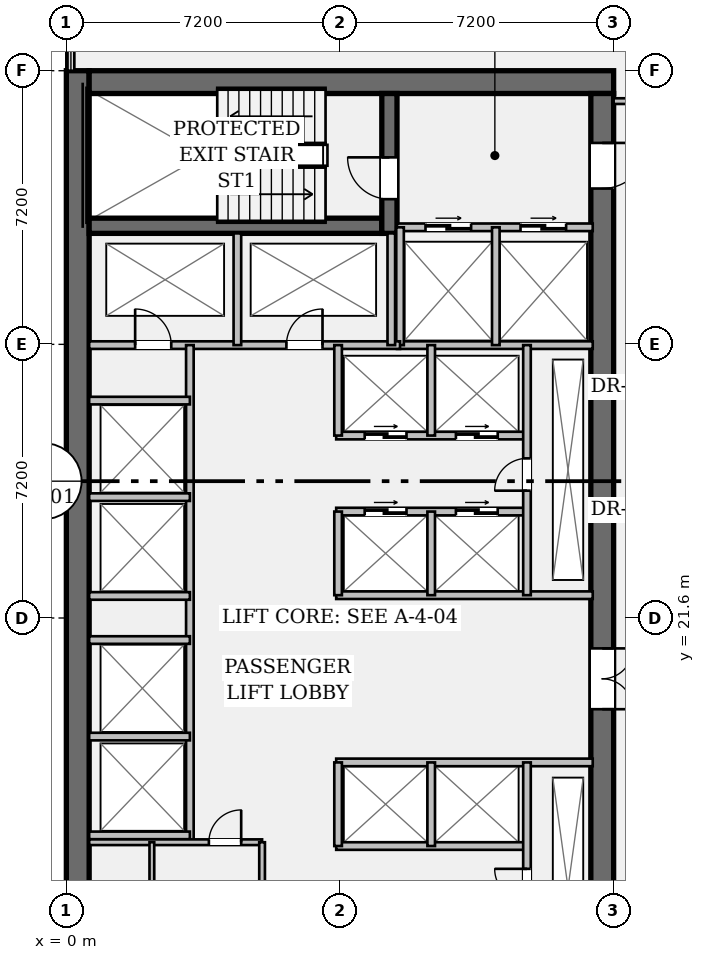
"""IFC4 building model, lengths in metres.
Left out: names, types, materials, properties, quantities, classifications, styles, units other than length and angle.
Written with IfcOpenShell. Run it as: python <this file> out.ifc"""

import sys

from ifc_helpers import new_model, si_unit, direction, frame, frame_2d, origin, place, context, subcontext, project, spatial, rectangle, extrude, element, fill, save


model = new_model("IFC4")
c1 = context("Model", 3, precision=1e-05, world=origin(), true_north=direction((0.0, 1.0)))
c2 = subcontext(c1, "Body", "Model", "MODEL_VIEW")
j1 = project(units=[si_unit("LENGTHUNIT", "METRE"), si_unit("PLANEANGLEUNIT", "RADIAN")], contexts=[c1])
p1 = place(None, origin())
s1 = spatial("IfcSite", under=j1, at=p1, CompositionType="ELEMENT")
p2 = place(p1, origin())
s2 = spatial("IfcBuilding", under=s1, at=p2, CompositionType="ELEMENT")
p3 = place(p2, frame((0.0, 0.0, 38.85)))
s3 = spatial("IfcBuildingStorey", under=s2, at=p3, CompositionType="ELEMENT", Elevation=38.85)
p4 = place(p3, frame((0.3, 7.2, 0.0), z_axis=(0.0, 0.0, 1.0), x_axis=(0.0, 1.0, 0.0)))
e1 = element("IfcWall", 1, at=p4, inside=s3, PredefinedType="SHEAR", context=c2, shape_type="SweptSolid", body=[
    extrude(rectangle(XDim=28.8, YDim=0.6, at=frame_2d((14.4, 0.0))), origin(), (0.0, 0.0, 1.0), 3.57),
])
p5 = place(p3, frame((0.6, 35.7, 0.0), z_axis=(0.0, 0.0, 1.0), x_axis=(1.0, 0.0, 0.0)))
e2 = element("IfcWall", 2, at=p5, inside=s3, PredefinedType="SHEAR", context=c2, shape_type="SweptSolid", body=[
    extrude(rectangle(XDim=13.8, YDim=0.6, at=frame_2d((6.9, 0.0))), origin(), (0.0, 0.0, 1.0), 3.57),
])
p6 = place(p3, frame((14.1, 35.4, 0.0), z_axis=(0.0, 0.0, 1.0), x_axis=(0.0, -1.0, 0.0)))
e3 = element("IfcWall", 3, at=p6, inside=s3, PredefinedType="SHEAR", context=c2, shape_type="SweptSolid", body=[
    extrude(rectangle(XDim=27.6, YDim=0.6, at=frame_2d((13.8, 0.0))), origin(), (0.0, 0.0, 1.0), 3.57),
])
p7 = place(p6, frame((1.3, 0.0, 0.0)))
e4 = element("IfcOpeningElement", 4, at=p7, cuts=e3, PredefinedType="OPENING", context=c2, shape_type="SweptSolid", body=[
    extrude(rectangle(XDim=1.2, YDim=2.15, at=frame_2d((0.6, 1.075))), frame((0.0, 0.312, 0.0), z_axis=(0.0, -1.0, 0.0), x_axis=(1.0, 0.0, 0.0)), (0.0, 0.0, 1.0), 0.624),
])
p8 = place(p6, frame((25.25, 0.0, 0.0)))
e5 = element("IfcOpeningElement", 5, at=p8, cuts=e3, PredefinedType="OPENING", context=c2, shape_type="SweptSolid", body=[
    extrude(rectangle(XDim=1.2, YDim=2.15, at=frame_2d((0.6, 1.075))), frame((0.0, 0.312, 0.0), z_axis=(0.0, -1.0, 0.0), x_axis=(1.0, 0.0, 0.0)), (0.0, 0.0, 1.0), 0.624),
])
p9 = place(p6, frame((14.6, 0.0, 0.0)))
e6 = element("IfcOpeningElement", 6, at=p9, cuts=e3, PredefinedType="OPENING", context=c2, shape_type="SweptSolid", body=[
    extrude(rectangle(XDim=1.6, YDim=2.2, at=frame_2d((0.8, 1.1))), frame((0.0, 0.312, 0.0), z_axis=(0.0, -1.0, 0.0), x_axis=(1.0, 0.0, 0.0)), (0.0, 0.0, 1.0), 0.624),
])
p10 = place(p3, frame((0.6, 31.92, 0.0), z_axis=(0.0, 0.0, 1.0), x_axis=(1.0, 0.0, 0.0)))
e7 = element("IfcWall", 7, at=p10, inside=s3, PredefinedType="SHEAR", context=c2, shape_type="SweptSolid", body=[
    extrude(rectangle(XDim=7.7, YDim=0.4, at=frame_2d((3.85, 0.0))), origin(), (0.0, 0.0, 1.0), 3.57),
])
p11 = place(p3, frame((8.5, 31.72, 0.0), z_axis=(0.0, 0.0, 1.0), x_axis=(0.0, 1.0, 0.0)))
e8 = element("IfcWall", 8, at=p11, inside=s3, PredefinedType="SHEAR", context=c2, shape_type="SweptSolid", body=[
    extrude(rectangle(XDim=3.68, YDim=0.4, at=frame_2d((1.84, 0.0))), origin(), (0.0, 0.0, 1.0), 3.57),
])
p12 = place(p11, frame((0.9, 0.0, 0.0)))
e9 = element("IfcOpeningElement", 9, at=p12, cuts=e8, PredefinedType="OPENING", context=c2, shape_type="SweptSolid", body=[
    extrude(rectangle(XDim=1.1, YDim=2.15, at=frame_2d((0.55, 1.075))), frame((0.0, 0.212, 0.0), z_axis=(0.0, -1.0, 0.0), x_axis=(1.0, 0.0, 0.0)), (0.0, 0.0, 1.0), 0.424),
])
p13 = place(p3, frame((8.7, 31.88, 0.0), z_axis=(0.0, 0.0, 1.0), x_axis=(1.0, 0.0, 0.0)))
e10 = element("IfcWall", 10, at=p13, inside=s3, PredefinedType="PARTITIONING", context=c2, shape_type="SweptSolid", body=[
    extrude(rectangle(XDim=5.15, YDim=0.2, at=frame_2d((2.575, 0.0))), origin(), (0.0, 0.0, 1.0), 3.57),
])
p14 = place(p13, frame((0.75, 0.0, 0.0)))
e11 = element("IfcOpeningElement", 11, at=p14, cuts=e10, PredefinedType="OPENING", context=c2, shape_type="SweptSolid", body=[
    extrude(rectangle(XDim=1.2, YDim=2.2, at=frame_2d((0.6, 1.1))), frame((0.0, 0.112, 0.0), z_axis=(0.0, -1.0, 0.0), x_axis=(1.0, 0.0, 0.0)), (0.0, 0.0, 1.0), 0.224),
])
p15 = place(p13, frame((3.25, 0.0, 0.0)))
e12 = element("IfcOpeningElement", 12, at=p15, cuts=e10, PredefinedType="OPENING", context=c2, shape_type="SweptSolid", body=[
    extrude(rectangle(XDim=1.2, YDim=2.2, at=frame_2d((0.6, 1.1))), frame((0.0, 0.112, 0.0), z_axis=(0.0, -1.0, 0.0), x_axis=(1.0, 0.0, 0.0)), (0.0, 0.0, 1.0), 0.224),
])
p16 = place(p3, frame((8.7, 28.78, 0.0), z_axis=(0.0, 0.0, 1.0), x_axis=(1.0, 0.0, 0.0)))
e13 = element("IfcWall", 13, at=p16, inside=s3, PredefinedType="PARTITIONING", context=c2, shape_type="SweptSolid", body=[
    extrude(rectangle(XDim=5.15, YDim=0.2, at=frame_2d((2.575, 0.0))), origin(), (0.0, 0.0, 1.0), 3.57),
])
for number, where, z_axis, x_axis in (
    (14, (8.78, 28.78, 0.0), (0.0, 0.0, 1.0), (0.0, 1.0, 0.0)),
    (15, (11.3, 28.78, 0.0), (0.0, 0.0, 1.0), (0.0, 1.0, 0.0)),
):
    element("IfcWall", number, at=place(p3, frame(where, z_axis=z_axis, x_axis=x_axis)), inside=s3, PredefinedType="PARTITIONING", context=c2, shape_type="SweptSolid", body=[
        extrude(rectangle(XDim=3.1, YDim=0.2, at=frame_2d((1.55, 0.0))), origin(), (0.0, 0.0, 1.0), 3.57),
    ])
p17 = place(p3, frame((0.6, 28.78, 0.0), z_axis=(0.0, 0.0, 1.0), x_axis=(1.0, 0.0, 0.0)))
e16 = element("IfcWall", 16, at=p17, inside=s3, PredefinedType="PARTITIONING", context=c2, shape_type="SweptSolid", body=[
    extrude(rectangle(XDim=8.18, YDim=0.2, at=frame_2d((4.09, 0.0))), origin(), (0.0, 0.0, 1.0), 3.57),
])
p18 = place(p17, frame((1.21, 0.0, 0.0)))
e17 = element("IfcOpeningElement", 17, at=p18, cuts=e16, PredefinedType="OPENING", context=c2, shape_type="SweptSolid", body=[
    extrude(rectangle(XDim=0.95, YDim=2.15, at=frame_2d((0.475, 1.075))), frame((0.0, 0.112, 0.0), z_axis=(0.0, -1.0, 0.0), x_axis=(1.0, 0.0, 0.0)), (0.0, 0.0, 1.0), 0.224),
])
p19 = place(p17, frame((5.19, 0.0, 0.0)))
e18 = element("IfcOpeningElement", 18, at=p19, cuts=e16, PredefinedType="OPENING", context=c2, shape_type="SweptSolid", body=[
    extrude(rectangle(XDim=0.95, YDim=2.15, at=frame_2d((0.475, 1.075))), frame((0.0, 0.112, 0.0), z_axis=(0.0, -1.0, 0.0), x_axis=(1.0, 0.0, 0.0)), (0.0, 0.0, 1.0), 0.224),
])
for number, where, z_axis, x_axis in (
    (19, (4.5, 28.78, 0.0), (0.0, 0.0, 1.0), (0.0, 1.0, 0.0)),
    (20, (8.55, 28.78, 0.0), (0.0, 0.0, 1.0), (0.0, 1.0, 0.0)),
):
    element("IfcWall", number, at=place(p3, frame(where, z_axis=z_axis, x_axis=x_axis)), inside=s3, PredefinedType="PARTITIONING", context=c2, shape_type="SweptSolid", body=[
        extrude(rectangle(XDim=2.94, YDim=0.2, at=frame_2d((1.47, 0.0))), origin(), (0.0, 0.0, 1.0), 3.57),
    ])
p20 = place(p3, frame((3.25, 15.7, 0.0), z_axis=(0.0, 0.0, 1.0), x_axis=(0.0, 1.0, 0.0)))
e21 = element("IfcWall", 21, at=p20, inside=s3, PredefinedType="PARTITIONING", context=c2, shape_type="SweptSolid", body=[
    extrude(rectangle(XDim=13.08, YDim=0.2, at=frame_2d((6.54, 0.0))), origin(), (0.0, 0.0, 1.0), 3.57),
])
for number, where, z_axis, x_axis in (
    (22, (0.6, 15.88, 0.0), (0.0, 0.0, 1.0), (1.0, 0.0, 0.0)),
    (23, (0.6, 18.48, 0.0), (0.0, 0.0, 1.0), (1.0, 0.0, 0.0)),
    (24, (0.6, 22.18, 0.0), (0.0, 0.0, 1.0), (1.0, 0.0, 0.0)),
    (25, (0.6, 24.78, 0.0), (0.0, 0.0, 1.0), (1.0, 0.0, 0.0)),
    (26, (0.6, 21.02, 0.0), (0.0, 0.0, 1.0), (1.0, 0.0, 0.0)),
    (27, (0.6, 27.32, 0.0), (0.0, 0.0, 1.0), (1.0, 0.0, 0.0)),
):
    element("IfcWall", number, at=place(p3, frame(where, z_axis=z_axis, x_axis=x_axis)), inside=s3, PredefinedType="PARTITIONING", context=c2, shape_type="SweptSolid", body=[
        extrude(rectangle(XDim=2.65, YDim=0.2, at=frame_2d((1.325, 0.0))), origin(), (0.0, 0.0, 1.0), 3.57),
    ])
p21 = place(p3, frame((7.1, 22.2, 0.0), z_axis=(0.0, 0.0, 1.0), x_axis=(1.0, 0.0, 0.0)))
e28 = element("IfcWall", 28, at=p21, inside=s3, PredefinedType="PARTITIONING", context=c2, shape_type="SweptSolid", body=[
    extrude(rectangle(XDim=6.75, YDim=0.2, at=frame_2d((3.375, 0.0))), origin(), (0.0, 0.0, 1.0), 3.57),
])
p22 = place(p3, frame((7.1, 24.4, 0.0), z_axis=(0.0, 0.0, 1.0), x_axis=(1.0, 0.0, 0.0)))
e29 = element("IfcWall", 29, at=p22, inside=s3, PredefinedType="PARTITIONING", context=c2, shape_type="SweptSolid", body=[
    extrude(rectangle(XDim=5.02, YDim=0.2, at=frame_2d((2.51, 0.0))), origin(), (0.0, 0.0, 1.0), 3.57),
])
p23 = place(p22, frame((0.75, 0.0, 0.0)))
e30 = element("IfcOpeningElement", 30, at=p23, cuts=e29, PredefinedType="OPENING", context=c2, shape_type="SweptSolid", body=[
    extrude(rectangle(XDim=1.1, YDim=2.2, at=frame_2d((0.55, 1.1))), frame((0.0, 0.112, 0.0), z_axis=(0.0, -1.0, 0.0), x_axis=(1.0, 0.0, 0.0)), (0.0, 0.0, 1.0), 0.224),
])
p24 = place(p22, frame((3.15, 0.0, 0.0)))
e31 = element("IfcOpeningElement", 31, at=p24, cuts=e29, PredefinedType="OPENING", context=c2, shape_type="SweptSolid", body=[
    extrude(rectangle(XDim=1.1, YDim=2.2, at=frame_2d((0.55, 1.1))), frame((0.0, 0.112, 0.0), z_axis=(0.0, -1.0, 0.0), x_axis=(1.0, 0.0, 0.0)), (0.0, 0.0, 1.0), 0.224),
])
p25 = place(p3, frame((7.1, 26.4, 0.0), z_axis=(0.0, 0.0, 1.0), x_axis=(1.0, 0.0, 0.0)))
e32 = element("IfcWall", 32, at=p25, inside=s3, PredefinedType="PARTITIONING", context=c2, shape_type="SweptSolid", body=[
    extrude(rectangle(XDim=5.02, YDim=0.2, at=frame_2d((2.51, 0.0))), origin(), (0.0, 0.0, 1.0), 3.57),
])
p26 = place(p25, frame((0.75, 0.0, 0.0)))
e33 = element("IfcOpeningElement", 33, at=p26, cuts=e32, PredefinedType="OPENING", context=c2, shape_type="SweptSolid", body=[
    extrude(rectangle(XDim=1.1, YDim=2.2, at=frame_2d((0.55, 1.1))), frame((0.0, 0.112, 0.0), z_axis=(0.0, -1.0, 0.0), x_axis=(1.0, 0.0, 0.0)), (0.0, 0.0, 1.0), 0.224),
])
p27 = place(p25, frame((3.15, 0.0, 0.0)))
e34 = element("IfcOpeningElement", 34, at=p27, cuts=e32, PredefinedType="OPENING", context=c2, shape_type="SweptSolid", body=[
    extrude(rectangle(XDim=1.1, YDim=2.2, at=frame_2d((0.55, 1.1))), frame((0.0, 0.112, 0.0), z_axis=(0.0, -1.0, 0.0), x_axis=(1.0, 0.0, 0.0)), (0.0, 0.0, 1.0), 0.224),
])
p28 = place(p3, frame((7.15, 22.2, 0.0), z_axis=(0.0, 0.0, 1.0), x_axis=(0.0, 1.0, 0.0)))
e35 = element("IfcWall", 35, at=p28, inside=s3, PredefinedType="PARTITIONING", context=c2, shape_type="SweptSolid", body=[
    extrude(rectangle(XDim=2.2, YDim=0.2, at=frame_2d((1.1, 0.0))), origin(), (0.0, 0.0, 1.0), 3.57),
])
p29 = place(p3, frame((7.15, 26.4, 0.0), z_axis=(0.0, 0.0, 1.0), x_axis=(0.0, 1.0, 0.0)))
e36 = element("IfcWall", 36, at=p29, inside=s3, PredefinedType="PARTITIONING", context=c2, shape_type="SweptSolid", body=[
    extrude(rectangle(XDim=2.38, YDim=0.2, at=frame_2d((1.19, 0.0))), origin(), (0.0, 0.0, 1.0), 3.57),
])
p30 = place(p3, frame((9.6, 22.2, 0.0), z_axis=(0.0, 0.0, 1.0), x_axis=(0.0, 1.0, 0.0)))
e37 = element("IfcWall", 37, at=p30, inside=s3, PredefinedType="PARTITIONING", context=c2, shape_type="SweptSolid", body=[
    extrude(rectangle(XDim=2.2, YDim=0.2, at=frame_2d((1.1, 0.0))), origin(), (0.0, 0.0, 1.0), 3.57),
])
p31 = place(p3, frame((9.6, 26.4, 0.0), z_axis=(0.0, 0.0, 1.0), x_axis=(0.0, 1.0, 0.0)))
e38 = element("IfcWall", 38, at=p31, inside=s3, PredefinedType="PARTITIONING", context=c2, shape_type="SweptSolid", body=[
    extrude(rectangle(XDim=2.38, YDim=0.2, at=frame_2d((1.19, 0.0))), origin(), (0.0, 0.0, 1.0), 3.57),
])
p32 = place(p3, frame((12.12, 22.2, 0.0), z_axis=(0.0, 0.0, 1.0), x_axis=(0.0, 1.0, 0.0)))
e39 = element("IfcWall", 39, at=p32, inside=s3, PredefinedType="PARTITIONING", context=c2, shape_type="SweptSolid", body=[
    extrude(rectangle(XDim=6.58, YDim=0.2, at=frame_2d((3.29, 0.0))), origin(), (0.0, 0.0, 1.0), 3.57),
])
p33 = place(p32, frame((2.75, 0.0, 0.0)))
e40 = element("IfcOpeningElement", 40, at=p33, cuts=e39, PredefinedType="OPENING", context=c2, shape_type="SweptSolid", body=[
    extrude(rectangle(XDim=0.85, YDim=2.15, at=frame_2d((0.425, 1.075))), frame((0.0, 0.112, 0.0), z_axis=(0.0, -1.0, 0.0), x_axis=(1.0, 0.0, 0.0)), (0.0, 0.0, 1.0), 0.224),
])
p34 = place(p3, frame((7.1, 17.8, 0.0), z_axis=(0.0, 0.0, 1.0), x_axis=(1.0, 0.0, 0.0)))
e41 = element("IfcWall", 41, at=p34, inside=s3, PredefinedType="PARTITIONING", context=c2, shape_type="SweptSolid", body=[
    extrude(rectangle(XDim=6.75, YDim=0.2, at=frame_2d((3.375, 0.0))), origin(), (0.0, 0.0, 1.0), 3.57),
])
p35 = place(p3, frame((7.1, 15.6, 0.0), z_axis=(0.0, 0.0, 1.0), x_axis=(1.0, 0.0, 0.0)))
e42 = element("IfcWall", 42, at=p35, inside=s3, PredefinedType="PARTITIONING", context=c2, shape_type="SweptSolid", body=[
    extrude(rectangle(XDim=5.02, YDim=0.2, at=frame_2d((2.51, 0.0))), origin(), (0.0, 0.0, 1.0), 3.57),
])
for number, where, z_axis, x_axis in (
    (43, (7.15, 15.6, 0.0), (0.0, 0.0, 1.0), (0.0, 1.0, 0.0)),
    (44, (9.6, 15.6, 0.0), (0.0, 0.0, 1.0), (0.0, 1.0, 0.0)),
):
    element("IfcWall", number, at=place(p3, frame(where, z_axis=z_axis, x_axis=x_axis)), inside=s3, PredefinedType="PARTITIONING", context=c2, shape_type="SweptSolid", body=[
        extrude(rectangle(XDim=2.2, YDim=0.2, at=frame_2d((1.1, 0.0))), origin(), (0.0, 0.0, 1.0), 3.57),
    ])
p36 = place(p3, frame((12.12, 11.2, 0.0), z_axis=(0.0, 0.0, 1.0), x_axis=(0.0, 1.0, 0.0)))
e45 = element("IfcWall", 45, at=p36, inside=s3, PredefinedType="PARTITIONING", context=c2, shape_type="SweptSolid", body=[
    extrude(rectangle(XDim=6.6, YDim=0.2, at=frame_2d((3.3, 0.0))), origin(), (0.0, 0.0, 1.0), 3.57),
])
p37 = place(p36, frame((2.95, 0.0, 0.0)))
e46 = element("IfcOpeningElement", 46, at=p37, cuts=e45, PredefinedType="OPENING", context=c2, shape_type="SweptSolid", body=[
    extrude(rectangle(XDim=0.85, YDim=2.15, at=frame_2d((0.425, 1.075))), frame((0.0, 0.112, 0.0), z_axis=(0.0, -1.0, 0.0), x_axis=(1.0, 0.0, 0.0)), (0.0, 0.0, 1.0), 0.224),
])
p38 = place(p3, frame((0.6, 15.7, 0.0), z_axis=(0.0, 0.0, 1.0), x_axis=(1.0, 0.0, 0.0)))
e47 = element("IfcWall", 47, at=p38, inside=s3, PredefinedType="PARTITIONING", context=c2, shape_type="SweptSolid", body=[
    extrude(rectangle(XDim=4.55, YDim=0.15, at=frame_2d((2.275, 0.0))), origin(), (0.0, 0.0, 1.0), 3.57),
])
p39 = place(p38, frame((3.15, 0.0, 0.0)))
e48 = element("IfcOpeningElement", 48, at=p39, cuts=e47, PredefinedType="OPENING", context=c2, shape_type="SweptSolid", body=[
    extrude(rectangle(XDim=0.85, YDim=2.15, at=frame_2d((0.425, 1.075))), frame((0.0, 0.087, 0.0), z_axis=(0.0, -1.0, 0.0), x_axis=(1.0, 0.0, 0.0)), (0.0, 0.0, 1.0), 0.174),
])
p40 = place(p3, frame((5.15, 11.28, 0.0), z_axis=(0.0, 0.0, 1.0), x_axis=(0.0, 1.0, 0.0)))
e49 = element("IfcWall", 49, at=p40, inside=s3, PredefinedType="PARTITIONING", context=c2, shape_type="SweptSolid", body=[
    extrude(rectangle(XDim=4.42, YDim=0.15, at=frame_2d((2.21, 0.0))), origin(), (0.0, 0.0, 1.0), 3.57),
])
p41 = place(p3, frame((2.25, 11.28, 0.0), z_axis=(0.0, 0.0, 1.0), x_axis=(0.0, 1.0, 0.0)))
e50 = element("IfcWall", 50, at=p41, inside=s3, PredefinedType="PARTITIONING", context=c2, shape_type="SweptSolid", body=[
    extrude(rectangle(XDim=4.42, YDim=0.125, at=frame_2d((2.21, 0.0))), origin(), (0.0, 0.0, 1.0), 3.57),
])
p42 = place(p41, frame((1.65, 0.0, 0.0)))
e51 = element("IfcOpeningElement", 51, at=p42, cuts=e50, PredefinedType="OPENING", context=c2, shape_type="SweptSolid", body=[
    extrude(rectangle(XDim=0.85, YDim=2.15, at=frame_2d((0.425, 1.075))), frame((0.0, 0.074, 0.0), z_axis=(0.0, -1.0, 0.0), x_axis=(1.0, 0.0, 0.0)), (0.0, 0.0, 1.0), 0.149),
])
p43 = place(p3, frame((14.4, 35.2, 0.0), z_axis=(0.0, 0.0, 1.0), x_axis=(1.0, 0.0, 0.0)))
e52 = element("IfcWall", 52, at=p43, inside=s3, PredefinedType="PARTITIONING", context=c2, shape_type="SweptSolid", body=[
    extrude(rectangle(XDim=2.95, YDim=0.15, at=frame_2d((1.475, 0.0))), origin(), (0.0, 0.0, 1.0), 2.628),
])
p44 = place(p43, frame((0.95, 0.0, 0.0)))
e53 = element("IfcOpeningElement", 53, at=p44, cuts=e52, PredefinedType="OPENING", context=c2, shape_type="SweptSolid", body=[
    extrude(rectangle(XDim=1.0, YDim=2.15, at=frame_2d((0.5, 1.075))), frame((0.0, 0.087, 0.0), z_axis=(0.0, -1.0, 0.0), x_axis=(1.0, 0.0, 0.0)), (0.0, 0.0, 1.0), 0.174),
])
p45 = place(p12, origin())
e54 = element("IfcDoor", 54, at=p45, inside=s3, OperationType="SINGLE_SWING_RIGHT", PredefinedType="DOOR", context=c2, shape_type="SweptSolid", body=[
    extrude(rectangle(XDim=1.1, YDim=2.15, at=frame_2d((0.55, 1.075))), frame((0.0, 0.025, 0.0), z_axis=(0.0, -1.0, 0.0), x_axis=(1.0, 0.0, 0.0)), (0.0, 0.0, 1.0), 0.05),
])
fill(e9, e54)
p46 = place(p7, origin())
e55 = element("IfcDoor", 55, at=p46, inside=s3, OperationType="SINGLE_SWING_LEFT", PredefinedType="DOOR", context=c2, shape_type="SweptSolid", body=[
    extrude(rectangle(XDim=1.2, YDim=2.15, at=frame_2d((0.6, 1.075))), frame((0.0, 0.025, 0.0), z_axis=(0.0, -1.0, 0.0), x_axis=(1.0, 0.0, 0.0)), (0.0, 0.0, 1.0), 0.05),
])
fill(e4, e55)
p47 = place(p14, origin())
e56 = element("IfcDoor", 56, at=p47, inside=s3, OperationType="DOUBLE_DOOR_SLIDING", PredefinedType="DOOR", context=c2, shape_type="SweptSolid", body=[
    extrude(rectangle(XDim=1.2, YDim=2.2, at=frame_2d((0.6, 1.1))), frame((0.0, 0.025, 0.0), z_axis=(0.0, -1.0, 0.0), x_axis=(1.0, 0.0, 0.0)), (0.0, 0.0, 1.0), 0.05),
])
fill(e11, e56)
p48 = place(p15, origin())
e57 = element("IfcDoor", 57, at=p48, inside=s3, OperationType="DOUBLE_DOOR_SLIDING", PredefinedType="DOOR", context=c2, shape_type="SweptSolid", body=[
    extrude(rectangle(XDim=1.2, YDim=2.2, at=frame_2d((0.6, 1.1))), frame((0.0, 0.025, 0.0), z_axis=(0.0, -1.0, 0.0), x_axis=(1.0, 0.0, 0.0)), (0.0, 0.0, 1.0), 0.05),
])
fill(e12, e57)
p49 = place(p18, origin())
e58 = element("IfcDoor", 58, at=p49, inside=s3, OperationType="SINGLE_SWING_LEFT", PredefinedType="DOOR", context=c2, shape_type="SweptSolid", body=[
    extrude(rectangle(XDim=0.95, YDim=2.15, at=frame_2d((0.475, 1.075))), frame((0.0, 0.025, 0.0), z_axis=(0.0, -1.0, 0.0), x_axis=(1.0, 0.0, 0.0)), (0.0, 0.0, 1.0), 0.05),
])
fill(e17, e58)
p50 = place(p19, origin())
e59 = element("IfcDoor", 59, at=p50, inside=s3, OperationType="SINGLE_SWING_RIGHT", PredefinedType="DOOR", context=c2, shape_type="SweptSolid", body=[
    extrude(rectangle(XDim=0.95, YDim=2.15, at=frame_2d((0.475, 1.075))), frame((0.0, 0.025, 0.0), z_axis=(0.0, -1.0, 0.0), x_axis=(1.0, 0.0, 0.0)), (0.0, 0.0, 1.0), 0.05),
])
fill(e18, e59)
p51 = place(p9, origin())
e60 = element("IfcDoor", 60, at=p51, inside=s3, OperationType="DOUBLE_DOOR_SINGLE_SWING", PredefinedType="DOOR", context=c2, shape_type="SweptSolid", body=[
    extrude(rectangle(XDim=1.6, YDim=2.2, at=frame_2d((0.8, 1.1))), frame((0.0, 0.025, 0.0), z_axis=(0.0, -1.0, 0.0), x_axis=(1.0, 0.0, 0.0)), (0.0, 0.0, 1.0), 0.05),
])
fill(e6, e60)
p52 = place(p33, origin())
e61 = element("IfcDoor", 61, at=p52, inside=s3, OperationType="SINGLE_SWING_LEFT", PredefinedType="DOOR", context=c2, shape_type="SweptSolid", body=[
    extrude(rectangle(XDim=0.85, YDim=2.15, at=frame_2d((0.425, 1.075))), frame((0.0, 0.025, 0.0), z_axis=(0.0, -1.0, 0.0), x_axis=(1.0, 0.0, 0.0)), (0.0, 0.0, 1.0), 0.05),
])
fill(e40, e61)
p53 = place(p23, origin())
e62 = element("IfcDoor", 62, at=p53, inside=s3, OperationType="DOUBLE_DOOR_SLIDING", PredefinedType="DOOR", context=c2, shape_type="SweptSolid", body=[
    extrude(rectangle(XDim=1.1, YDim=2.2, at=frame_2d((0.55, 1.1))), frame((0.0, 0.025, 0.0), z_axis=(0.0, -1.0, 0.0), x_axis=(1.0, 0.0, 0.0)), (0.0, 0.0, 1.0), 0.05),
])
fill(e30, e62)
p54 = place(p24, origin())
e63 = element("IfcDoor", 63, at=p54, inside=s3, OperationType="DOUBLE_DOOR_SLIDING", PredefinedType="DOOR", context=c2, shape_type="SweptSolid", body=[
    extrude(rectangle(XDim=1.1, YDim=2.2, at=frame_2d((0.55, 1.1))), frame((0.0, 0.025, 0.0), z_axis=(0.0, -1.0, 0.0), x_axis=(1.0, 0.0, 0.0)), (0.0, 0.0, 1.0), 0.05),
])
fill(e31, e63)
p55 = place(p26, origin())
e64 = element("IfcDoor", 64, at=p55, inside=s3, OperationType="DOUBLE_DOOR_SLIDING", PredefinedType="DOOR", context=c2, shape_type="SweptSolid", body=[
    extrude(rectangle(XDim=1.1, YDim=2.2, at=frame_2d((0.55, 1.1))), frame((0.0, 0.025, 0.0), z_axis=(0.0, -1.0, 0.0), x_axis=(1.0, 0.0, 0.0)), (0.0, 0.0, 1.0), 0.05),
])
fill(e33, e64)
p56 = place(p27, origin())
e65 = element("IfcDoor", 65, at=p56, inside=s3, OperationType="DOUBLE_DOOR_SLIDING", PredefinedType="DOOR", context=c2, shape_type="SweptSolid", body=[
    extrude(rectangle(XDim=1.1, YDim=2.2, at=frame_2d((0.55, 1.1))), frame((0.0, 0.025, 0.0), z_axis=(0.0, -1.0, 0.0), x_axis=(1.0, 0.0, 0.0)), (0.0, 0.0, 1.0), 0.05),
])
fill(e34, e65)
p57 = place(p37, origin())
e66 = element("IfcDoor", 66, at=p57, inside=s3, OperationType="SINGLE_SWING_RIGHT", PredefinedType="DOOR", context=c2, shape_type="SweptSolid", body=[
    extrude(rectangle(XDim=0.85, YDim=2.15, at=frame_2d((0.425, 1.075))), frame((0.0, 0.025, 0.0), z_axis=(0.0, -1.0, 0.0), x_axis=(1.0, 0.0, 0.0)), (0.0, 0.0, 1.0), 0.05),
])
fill(e46, e66)
p58 = place(p39, origin())
e67 = element("IfcDoor", 67, at=p58, inside=s3, OperationType="SINGLE_SWING_RIGHT", PredefinedType="DOOR", context=c2, shape_type="SweptSolid", body=[
    extrude(rectangle(XDim=0.85, YDim=2.15, at=frame_2d((0.425, 1.075))), frame((0.0, 0.025, 0.0), z_axis=(0.0, -1.0, 0.0), x_axis=(1.0, 0.0, 0.0)), (0.0, 0.0, 1.0), 0.05),
])
fill(e48, e67)
save(model, sys.argv[1])
